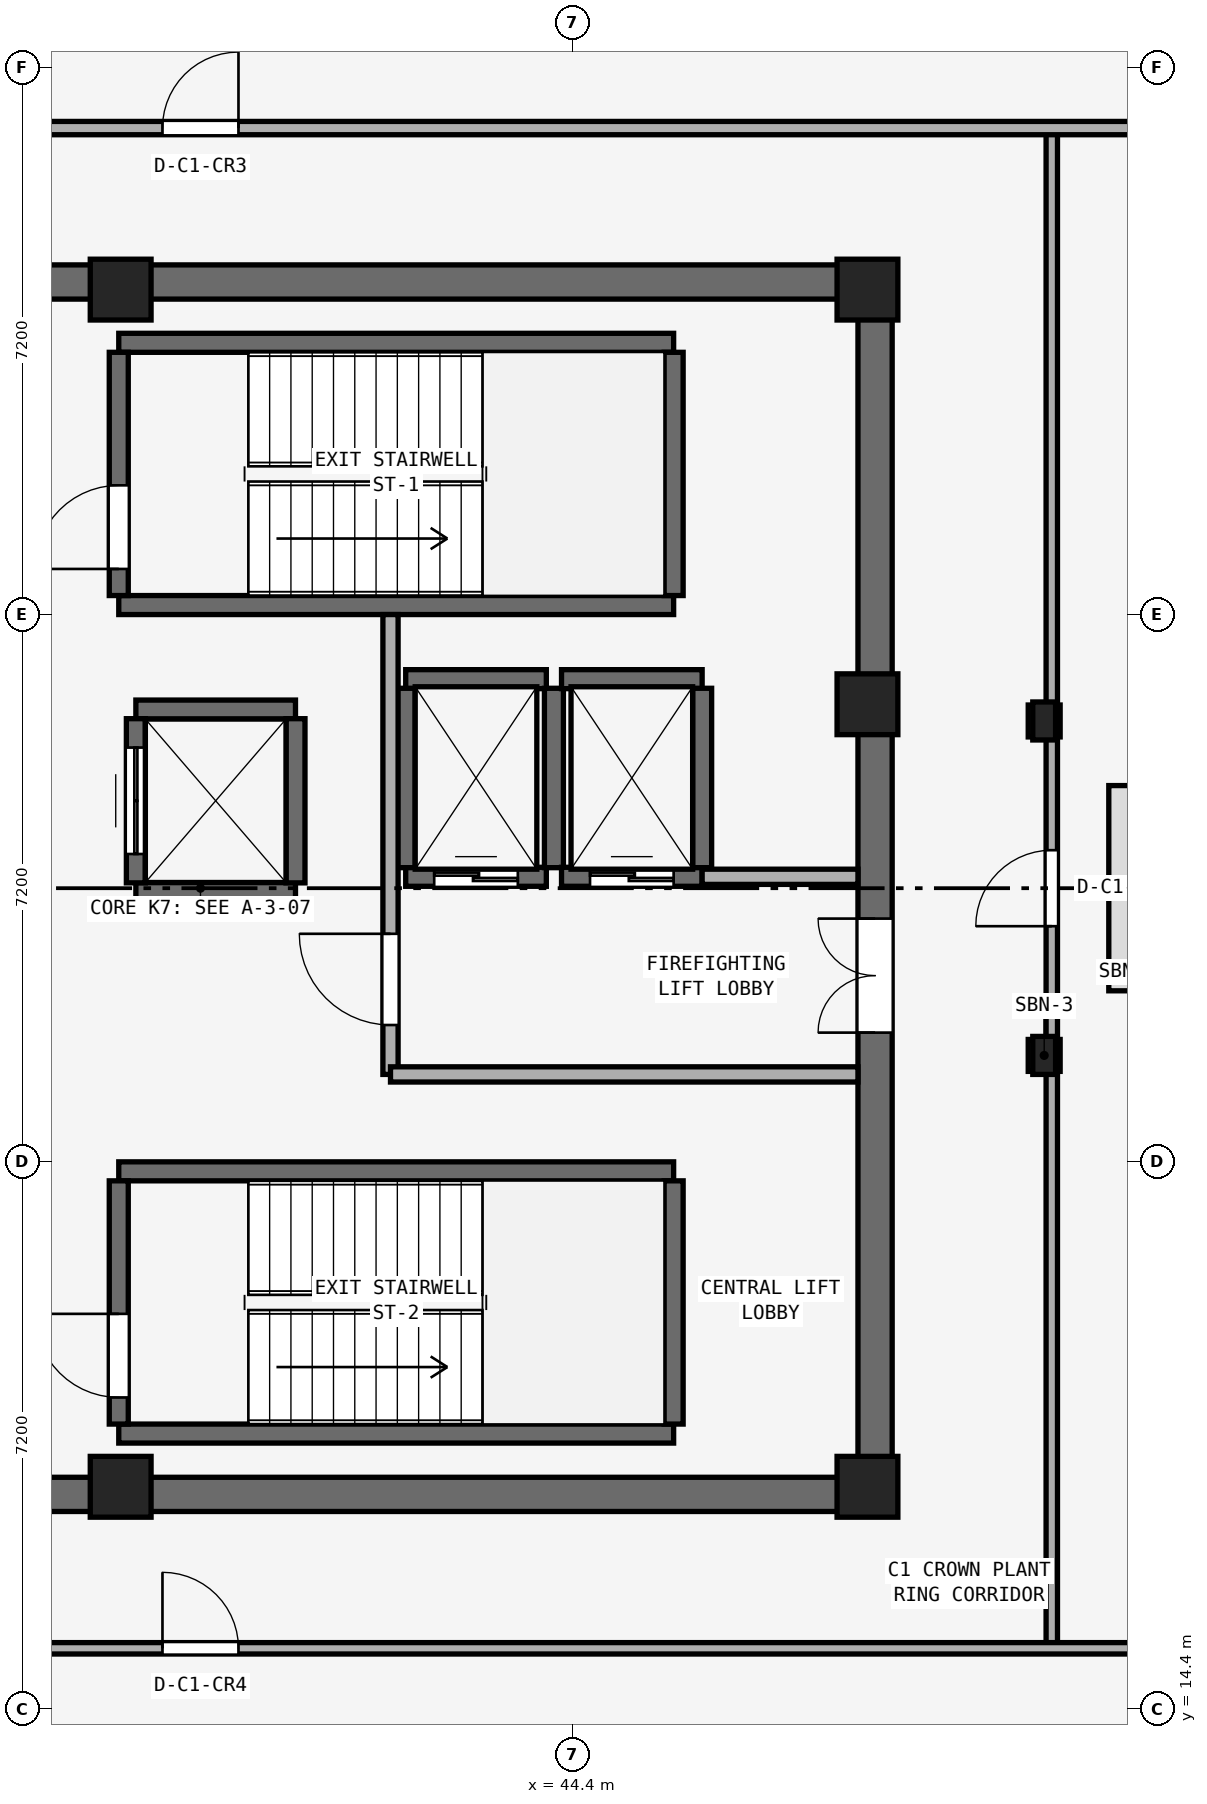
"""IFC4 building model, lengths in metres.
Left out: names, types, materials, properties, quantities, classifications, styles, units other than length and angle.
Written with IfcOpenShell. Run it as: python <this file> out.ifc"""

import sys

from ifc_helpers import new_model, si_unit, direction, frame, frame_2d, origin, origin_2d, place, context, subcontext, project, spatial, rectangle, i_section, extrude, element, fill, save


model = new_model("IFC4")
c1 = context("Model", 3, precision=1e-05, world=origin(), true_north=direction((0.0, 1.0)))
c2 = subcontext(c1, "Body", "Model", "MODEL_VIEW")
j1 = project(units=[si_unit("LENGTHUNIT", "METRE"), si_unit("PLANEANGLEUNIT", "RADIAN")], contexts=[c1])
p1 = place(None, origin())
s1 = spatial("IfcSite", under=j1, at=p1, CompositionType="ELEMENT")
p2 = place(p1, origin())
s2 = spatial("IfcBuilding", under=s1, at=p2, CompositionType="ELEMENT")
p3 = place(p2, frame((0.0, 0.0, 313.4)))
s3 = spatial("IfcBuildingStorey", under=s2, at=p3, CompositionType="ELEMENT", Elevation=313.4)
for number, where, z_axis, x_axis in (
    (1, (30.4, 17.225, 0.0), (0.0, 0.0, 1.0), (1.0, 0.0, 0.0)),
    (2, (30.4, 33.175, 0.0), (0.0, 0.0, 1.0), (1.0, 0.0, 0.0)),
):
    element("IfcWall", number, at=place(p3, frame(where, z_axis=z_axis, x_axis=x_axis)), inside=s3, PredefinedType="SHEAR", context=c2, shape_type="SweptSolid", body=[
        extrude(rectangle(XDim=18.2, YDim=0.45, at=frame_2d((9.1, 0.0))), origin(), (0.0, 0.0, 1.0), 3.72),
    ])
p4 = place(p3, frame((48.375, 17.45, 0.0), z_axis=(0.0, 0.0, 1.0), x_axis=(0.0, 1.0, 0.0)))
e3 = element("IfcWall", 3, at=p4, inside=s3, PredefinedType="SHEAR", context=c2, shape_type="SweptSolid", body=[
    extrude(rectangle(XDim=15.5, YDim=0.45, at=frame_2d((7.75, 0.0))), origin(), (0.0, 0.0, 1.0), 3.72),
])
p5 = place(p4, frame((5.85, 0.0, 0.0)))
e4 = element("IfcOpeningElement", 4, at=p5, cuts=e3, PredefinedType="OPENING", context=c2, shape_type="SweptSolid", body=[
    extrude(rectangle(XDim=1.5, YDim=2.15, at=frame_2d((0.75, 1.075))), frame((0.0, 0.235, 0.0), z_axis=(0.0, -1.0, 0.0), x_axis=(1.0, 0.0, 0.0)), (0.0, 0.0, 1.0), 0.47),
])
for number, where, z_axis, x_axis in (
    (5, (38.45, 17.325, 0.0), (0.0, 0.0, 1.0), (1.0, 0.0, 0.0)),
    (6, (48.275, 17.325, 0.0), (0.0, 0.0, 1.0), (1.0, 0.0, 0.0)),
    (7, (48.275, 27.62, 0.0), (0.0, 0.0, 1.0), (1.0, 0.0, 0.0)),
    (8, (48.275, 33.075, 0.0), (0.0, 0.0, 1.0), (1.0, 0.0, 0.0)),
    (9, (38.45, 33.075, 0.0), (0.0, 0.0, 1.0), (1.0, 0.0, 0.0)),
):
    element("IfcColumn", number, at=place(p3, frame(where, z_axis=z_axis, x_axis=x_axis)), inside=s3, PredefinedType="PILASTER", context=c2, shape_type="SweptSolid", body=[
        extrude(rectangle(XDim=0.8, YDim=0.8, at=origin_2d()), origin(), (0.0, 0.0, 1.0), 4.0),
    ])
for number, where, z_axis, x_axis in (
    (10, (50.6, 23.0, -0.28), (0.0, 0.0, 1.0), (1.0, 0.0, 0.0)),
    (11, (50.6, 27.4, -0.28), (0.0, 0.0, 1.0), (1.0, 0.0, 0.0)),
):
    element("IfcColumn", number, at=place(p3, frame(where, z_axis=z_axis, x_axis=x_axis)), inside=s3, PredefinedType="COLUMN", context=c2, shape_type="SweptSolid", body=[
        extrude(i_section(OverallWidth=0.3, OverallDepth=0.5, WebThickness=0.014, FlangeThickness=0.028, at=origin_2d()), origin(), (0.0, 0.0, 1.0), 4.28),
    ])
for number, where, z_axis, x_axis in (
    (12, (38.425, 28.925, 0.0), (0.0, 0.0, 1.0), (1.0, 0.0, 0.0)),
    (13, (38.425, 32.375, 0.0), (0.0, 0.0, 1.0), (1.0, 0.0, 0.0)),
):
    element("IfcWall", number, at=place(p3, frame(where, z_axis=z_axis, x_axis=x_axis)), inside=s3, PredefinedType="SHEAR", context=c2, shape_type="SweptSolid", body=[
        extrude(rectangle(XDim=7.3, YDim=0.25, at=frame_2d((3.65, 0.0))), origin(), (0.0, 0.0, 1.0), 3.72),
    ])
p6 = place(p3, frame((38.425, 29.05, 0.0), z_axis=(0.0, 0.0, 1.0), x_axis=(0.0, 1.0, 0.0)))
e14 = element("IfcWall", 14, at=p6, inside=s3, PredefinedType="SHEAR", context=c2, shape_type="SweptSolid", body=[
    extrude(rectangle(XDim=3.2, YDim=0.25, at=frame_2d((1.6, 0.0))), origin(), (0.0, 0.0, 1.0), 3.72),
])
p7 = place(p6, frame((0.35, 0.0, 0.0)))
e15 = element("IfcOpeningElement", 15, at=p7, cuts=e14, PredefinedType="OPENING", context=c2, shape_type="SweptSolid", body=[
    extrude(rectangle(XDim=1.1, YDim=2.15, at=frame_2d((0.55, 1.075))), frame((0.0, 0.135, 0.0), z_axis=(0.0, -1.0, 0.0), x_axis=(1.0, 0.0, 0.0)), (0.0, 0.0, 1.0), 0.27),
])
p8 = place(p3, frame((45.725, 29.05, 0.0), z_axis=(0.0, 0.0, 1.0), x_axis=(0.0, 1.0, 0.0)))
e16 = element("IfcWall", 16, at=p8, inside=s3, PredefinedType="SHEAR", context=c2, shape_type="SweptSolid", body=[
    extrude(rectangle(XDim=3.2, YDim=0.25, at=frame_2d((1.6, 0.0))), origin(), (0.0, 0.0, 1.0), 3.72),
])
for number, where, z_axis, x_axis in (
    (17, (38.425, 18.025, 0.0), (0.0, 0.0, 1.0), (1.0, 0.0, 0.0)),
    (18, (38.425, 21.475, 0.0), (0.0, 0.0, 1.0), (1.0, 0.0, 0.0)),
):
    element("IfcWall", number, at=place(p3, frame(where, z_axis=z_axis, x_axis=x_axis)), inside=s3, PredefinedType="SHEAR", context=c2, shape_type="SweptSolid", body=[
        extrude(rectangle(XDim=7.3, YDim=0.25, at=frame_2d((3.65, 0.0))), origin(), (0.0, 0.0, 1.0), 3.72),
    ])
p9 = place(p3, frame((38.425, 18.15, 0.0), z_axis=(0.0, 0.0, 1.0), x_axis=(0.0, 1.0, 0.0)))
e19 = element("IfcWall", 19, at=p9, inside=s3, PredefinedType="SHEAR", context=c2, shape_type="SweptSolid", body=[
    extrude(rectangle(XDim=3.2, YDim=0.25, at=frame_2d((1.6, 0.0))), origin(), (0.0, 0.0, 1.0), 3.72),
])
p10 = place(p9, frame((0.35, 0.0, 0.0)))
e20 = element("IfcOpeningElement", 20, at=p10, cuts=e19, PredefinedType="OPENING", context=c2, shape_type="SweptSolid", body=[
    extrude(rectangle(XDim=1.1, YDim=2.15, at=frame_2d((0.55, 1.075))), frame((0.0, 0.135, 0.0), z_axis=(0.0, -1.0, 0.0), x_axis=(1.0, 0.0, 0.0)), (0.0, 0.0, 1.0), 0.27),
])
p11 = place(p3, frame((45.725, 18.15, 0.0), z_axis=(0.0, 0.0, 1.0), x_axis=(0.0, 1.0, 0.0)))
e21 = element("IfcWall", 21, at=p11, inside=s3, PredefinedType="SHEAR", context=c2, shape_type="SweptSolid", body=[
    extrude(rectangle(XDim=3.2, YDim=0.25, at=frame_2d((1.6, 0.0))), origin(), (0.0, 0.0, 1.0), 3.72),
])
p12 = place(p3, frame((42.2, 25.35, 0.0), z_axis=(0.0, 0.0, 1.0), x_axis=(1.0, 0.0, 0.0)))
e22 = element("IfcWall", 22, at=p12, inside=s3, PredefinedType="SHEAR", context=c2, shape_type="SweptSolid", body=[
    extrude(rectangle(XDim=1.85, YDim=0.25, at=frame_2d((0.925, 0.0))), origin(), (0.0, 0.0, 1.0), 3.72),
])
p13 = place(p12, frame((0.375, 0.0, 0.0)))
e23 = element("IfcOpeningElement", 23, at=p13, cuts=e22, PredefinedType="OPENING", context=c2, shape_type="SweptSolid", body=[
    extrude(rectangle(XDim=1.1, YDim=2.15, at=frame_2d((0.55, 1.075))), frame((0.0, 0.135, 0.0), z_axis=(0.0, -1.0, 0.0), x_axis=(1.0, 0.0, 0.0)), (0.0, 0.0, 1.0), 0.27),
])
p14 = place(p3, frame((42.2, 27.95, 0.0), z_axis=(0.0, 0.0, 1.0), x_axis=(1.0, 0.0, 0.0)))
e24 = element("IfcWall", 24, at=p14, inside=s3, PredefinedType="SHEAR", context=c2, shape_type="SweptSolid", body=[
    extrude(rectangle(XDim=1.85, YDim=0.25, at=frame_2d((0.925, 0.0))), origin(), (0.0, 0.0, 1.0), 3.72),
])
for number, where, z_axis, x_axis in (
    (25, (42.2, 25.47, 0.0), (0.0, 0.0, 1.0), (0.0, 1.0, 0.0)),
    (26, (44.15, 25.47, 0.0), (0.0, 0.0, 1.0), (0.0, 1.0, 0.0)),
):
    element("IfcWall", number, at=place(p3, frame(where, z_axis=z_axis, x_axis=x_axis)), inside=s3, PredefinedType="SHEAR", context=c2, shape_type="SweptSolid", body=[
        extrude(rectangle(XDim=2.36, YDim=0.25, at=frame_2d((1.18, 0.0))), origin(), (0.0, 0.0, 1.0), 3.72),
    ])
p15 = place(p3, frame((44.25, 25.35, 0.0), z_axis=(0.0, 0.0, 1.0), x_axis=(1.0, 0.0, 0.0)))
e27 = element("IfcWall", 27, at=p15, inside=s3, PredefinedType="SHEAR", context=c2, shape_type="SweptSolid", body=[
    extrude(rectangle(XDim=1.85, YDim=0.25, at=frame_2d((0.925, 0.0))), origin(), (0.0, 0.0, 1.0), 3.72),
])
p16 = place(p15, frame((0.375, 0.0, 0.0)))
e28 = element("IfcOpeningElement", 28, at=p16, cuts=e27, PredefinedType="OPENING", context=c2, shape_type="SweptSolid", body=[
    extrude(rectangle(XDim=1.1, YDim=2.15, at=frame_2d((0.55, 1.075))), frame((0.0, 0.135, 0.0), z_axis=(0.0, -1.0, 0.0), x_axis=(1.0, 0.0, 0.0)), (0.0, 0.0, 1.0), 0.27),
])
p17 = place(p3, frame((44.25, 27.95, 0.0), z_axis=(0.0, 0.0, 1.0), x_axis=(1.0, 0.0, 0.0)))
e29 = element("IfcWall", 29, at=p17, inside=s3, PredefinedType="SHEAR", context=c2, shape_type="SweptSolid", body=[
    extrude(rectangle(XDim=1.85, YDim=0.25, at=frame_2d((0.925, 0.0))), origin(), (0.0, 0.0, 1.0), 3.72),
])
p18 = place(p3, frame((46.1, 25.47, 0.0), z_axis=(0.0, 0.0, 1.0), x_axis=(0.0, 1.0, 0.0)))
e30 = element("IfcWall", 30, at=p18, inside=s3, PredefinedType="SHEAR", context=c2, shape_type="SweptSolid", body=[
    extrude(rectangle(XDim=2.36, YDim=0.25, at=frame_2d((1.18, 0.0))), origin(), (0.0, 0.0, 1.0), 3.72),
])
for number, where, z_axis, x_axis in (
    (31, (38.65, 25.15, 0.0), (0.0, 0.0, 1.0), (1.0, 0.0, 0.0)),
    (32, (38.65, 27.55, 0.0), (0.0, 0.0, 1.0), (1.0, 0.0, 0.0)),
):
    element("IfcWall", number, at=place(p3, frame(where, z_axis=z_axis, x_axis=x_axis)), inside=s3, PredefinedType="SHEAR", context=c2, shape_type="SweptSolid", body=[
        extrude(rectangle(XDim=2.1, YDim=0.25, at=frame_2d((1.05, 0.0))), origin(), (0.0, 0.0, 1.0), 3.72),
    ])
p19 = place(p3, frame((38.65, 25.27, 0.0), z_axis=(0.0, 0.0, 1.0), x_axis=(0.0, 1.0, 0.0)))
e33 = element("IfcWall", 33, at=p19, inside=s3, PredefinedType="SHEAR", context=c2, shape_type="SweptSolid", body=[
    extrude(rectangle(XDim=2.16, YDim=0.25, at=frame_2d((1.08, 0.0))), origin(), (0.0, 0.0, 1.0), 3.72),
])
p20 = place(p19, frame((0.38, 0.0, 0.0)))
e34 = element("IfcOpeningElement", 34, at=p20, cuts=e33, PredefinedType="OPENING", context=c2, shape_type="SweptSolid", body=[
    extrude(rectangle(XDim=1.4, YDim=2.2, at=frame_2d((0.7, 1.1))), frame((0.0, 0.135, 0.0), z_axis=(0.0, -1.0, 0.0), x_axis=(1.0, 0.0, 0.0)), (0.0, 0.0, 1.0), 0.27),
])
p21 = place(p3, frame((40.75, 25.27, 0.0), z_axis=(0.0, 0.0, 1.0), x_axis=(0.0, 1.0, 0.0)))
e35 = element("IfcWall", 35, at=p21, inside=s3, PredefinedType="SHEAR", context=c2, shape_type="SweptSolid", body=[
    extrude(rectangle(XDim=2.16, YDim=0.25, at=frame_2d((1.08, 0.0))), origin(), (0.0, 0.0, 1.0), 3.72),
])
p22 = place(p3, frame((42.0, 22.75, 0.0), z_axis=(0.0, 0.0, 1.0), x_axis=(0.0, 1.0, 0.0)))
e36 = element("IfcWall", 36, at=p22, inside=s3, PredefinedType="SOLIDWALL", context=c2, shape_type="SweptSolid", body=[
    extrude(rectangle(XDim=6.05, YDim=0.2, at=frame_2d((3.025, 0.0))), origin(), (0.0, 0.0, 1.0), 3.72),
])
p23 = place(p22, frame((0.65, 0.0, 0.0)))
e37 = element("IfcOpeningElement", 37, at=p23, cuts=e36, PredefinedType="OPENING", context=c2, shape_type="SweptSolid", body=[
    extrude(rectangle(XDim=1.2, YDim=2.15, at=frame_2d((0.6, 1.075))), frame((0.0, 0.11, 0.0), z_axis=(0.0, -1.0, 0.0), x_axis=(1.0, 0.0, 0.0)), (0.0, 0.0, 1.0), 0.22),
])
p24 = place(p3, frame((42.0, 22.75, 0.0), z_axis=(0.0, 0.0, 1.0), x_axis=(1.0, 0.0, 0.0)))
e38 = element("IfcWall", 38, at=p24, inside=s3, PredefinedType="SOLIDWALL", context=c2, shape_type="SweptSolid", body=[
    extrude(rectangle(XDim=6.15, YDim=0.2, at=frame_2d((3.075, 0.0))), origin(), (0.0, 0.0, 1.0), 3.72),
])
p25 = place(p3, frame((46.1, 25.35, 0.0), z_axis=(0.0, 0.0, 1.0), x_axis=(1.0, 0.0, 0.0)))
e39 = element("IfcWall", 39, at=p25, inside=s3, PredefinedType="SOLIDWALL", context=c2, shape_type="SweptSolid", body=[
    extrude(rectangle(XDim=2.05, YDim=0.2, at=frame_2d((1.025, 0.0))), origin(), (0.0, 0.0, 1.0), 3.72),
])
p26 = place(p3, frame((50.7, 15.2, 0.0), z_axis=(0.0, 0.0, 1.0), x_axis=(0.0, 1.0, 0.0)))
e40 = element("IfcWall", 40, at=p26, inside=s3, PredefinedType="PARTITIONING", context=c2, shape_type="SweptSolid", body=[
    extrude(rectangle(XDim=20.0, YDim=0.15, at=frame_2d((10.0, 0.0))), origin(), (0.0, 0.0, 1.0), 3.72),
])
p27 = place(p26, frame((9.5, 0.0, 0.0)))
e41 = element("IfcOpeningElement", 41, at=p27, cuts=e40, PredefinedType="OPENING", context=c2, shape_type="SweptSolid", body=[
    extrude(rectangle(XDim=1.0, YDim=2.12, at=frame_2d((0.5, 1.06))), frame((0.0, 0.085, 0.0), z_axis=(0.0, -1.0, 0.0), x_axis=(1.0, 0.0, 0.0)), (0.0, 0.0, 1.0), 0.17),
])
p28 = place(p3, frame((19.292, 15.2, 0.0), z_axis=(0.0, 0.0, 1.0), x_axis=(1.0, 0.0, 0.0)))
e42 = element("IfcWall", 42, at=p28, inside=s3, PredefinedType="PARTITIONING", context=c2, shape_type="SweptSolid", body=[
    extrude(rectangle(XDim=39.076, YDim=0.15, at=frame_2d((19.538, 0.0))), origin(), (0.0, 0.0, 1.0), 3.103),
])
p29 = place(p28, frame((19.708, 0.0, 0.0)))
e43 = element("IfcOpeningElement", 43, at=p29, cuts=e42, PredefinedType="OPENING", context=c2, shape_type="SweptSolid", body=[
    extrude(rectangle(XDim=1.0, YDim=2.12, at=frame_2d((0.5, 1.06))), frame((0.0, 0.085, 0.0), z_axis=(0.0, -1.0, 0.0), x_axis=(1.0, 0.0, 0.0)), (0.0, 0.0, 1.0), 0.17),
])
p30 = place(p3, frame((20.01, 35.2, 0.0), z_axis=(0.0, 0.0, 1.0), x_axis=(1.0, 0.0, 0.0)))
e44 = element("IfcWall", 44, at=p30, inside=s3, PredefinedType="PARTITIONING", context=c2, shape_type="SweptSolid", body=[
    extrude(rectangle(XDim=39.04, YDim=0.175, at=frame_2d((19.52, 0.0))), origin(), (0.0, 0.0, 1.0), 3.103),
])
p31 = place(p30, frame((18.99, 0.0, 0.0)))
e45 = element("IfcOpeningElement", 45, at=p31, cuts=e44, PredefinedType="OPENING", context=c2, shape_type="SweptSolid", body=[
    extrude(rectangle(XDim=1.0, YDim=2.12, at=frame_2d((0.5, 1.06))), frame((0.0, 0.097, 0.0), z_axis=(0.0, -1.0, 0.0), x_axis=(1.0, 0.0, 0.0)), (0.0, 0.0, 1.0), 0.195),
])
p32 = place(p3, frame((47.908, 6.388, 0.0), z_axis=(0.0, 0.0, 1.0), x_axis=(0.763574643448, 0.645719570621, 0.0)))
e46 = element("IfcWall", 46, at=p32, inside=s3, PredefinedType="STANDARD", context=c2, shape_type="SweptSolid", body=[
    extrude(rectangle(XDim=13.616, YDim=0.28, at=frame_2d((6.808, 0.0))), origin(), (0.0, 0.0, 1.0), 3.72),
])
p33 = place(p32, frame((1.803, 0.0, 0.9)))
e47 = element("IfcOpeningElement", 47, at=p33, cuts=e46, PredefinedType="OPENING", context=c2, shape_type="SweptSolid", body=[
    extrude(rectangle(XDim=1.6, YDim=1.45, at=frame_2d((0.8, 0.725))), frame((0.0, 0.15, 0.0), z_axis=(0.0, -1.0, 0.0), x_axis=(1.0, 0.0, 0.0)), (0.0, 0.0, 1.0), 0.3),
])
p34 = place(p32, frame((6.008, 0.0, 0.9)))
e48 = element("IfcOpeningElement", 48, at=p34, cuts=e46, PredefinedType="OPENING", context=c2, shape_type="SweptSolid", body=[
    extrude(rectangle(XDim=1.6, YDim=1.45, at=frame_2d((0.8, 0.725))), frame((0.0, 0.15, 0.0), z_axis=(0.0, -1.0, 0.0), x_axis=(1.0, 0.0, 0.0)), (0.0, 0.0, 1.0), 0.3),
])
p35 = place(p32, frame((10.213, 0.0, 0.9)))
e49 = element("IfcOpeningElement", 49, at=p35, cuts=e46, PredefinedType="OPENING", context=c2, shape_type="SweptSolid", body=[
    extrude(rectangle(XDim=1.6, YDim=1.45, at=frame_2d((0.8, 0.725))), frame((0.0, 0.15, 0.0), z_axis=(0.0, -1.0, 0.0), x_axis=(1.0, 0.0, 0.0)), (0.0, 0.0, 1.0), 0.3),
])
p36 = place(p7, origin())
e50 = element("IfcDoor", 50, at=p36, inside=s3, OperationType="SINGLE_SWING_LEFT", PredefinedType="DOOR", context=c2, shape_type="SweptSolid", body=[
    extrude(rectangle(XDim=1.1, YDim=2.15, at=frame_2d((0.55, 1.075))), frame((0.0, 0.025, 0.0), z_axis=(0.0, -1.0, 0.0), x_axis=(1.0, 0.0, 0.0)), (0.0, 0.0, 1.0), 0.05),
])
fill(e15, e50)
p37 = place(p10, origin())
e51 = element("IfcDoor", 51, at=p37, inside=s3, OperationType="SINGLE_SWING_RIGHT", PredefinedType="DOOR", context=c2, shape_type="SweptSolid", body=[
    extrude(rectangle(XDim=1.1, YDim=2.15, at=frame_2d((0.55, 1.075))), frame((0.0, 0.025, 0.0), z_axis=(0.0, -1.0, 0.0), x_axis=(1.0, 0.0, 0.0)), (0.0, 0.0, 1.0), 0.05),
])
fill(e20, e51)
p38 = place(p13, origin())
e52 = element("IfcDoor", 52, at=p38, inside=s3, OperationType="DOUBLE_DOOR_SLIDING", PredefinedType="DOOR", context=c2, shape_type="SweptSolid", body=[
    extrude(rectangle(XDim=1.1, YDim=2.15, at=frame_2d((0.55, 1.075))), frame((0.0, 0.025, 0.0), z_axis=(0.0, -1.0, 0.0), x_axis=(1.0, 0.0, 0.0)), (0.0, 0.0, 1.0), 0.05),
])
fill(e23, e52)
p39 = place(p16, origin())
e53 = element("IfcDoor", 53, at=p39, inside=s3, OperationType="DOUBLE_DOOR_SLIDING", PredefinedType="DOOR", context=c2, shape_type="SweptSolid", body=[
    extrude(rectangle(XDim=1.1, YDim=2.15, at=frame_2d((0.55, 1.075))), frame((0.0, 0.025, 0.0), z_axis=(0.0, -1.0, 0.0), x_axis=(1.0, 0.0, 0.0)), (0.0, 0.0, 1.0), 0.05),
])
fill(e28, e53)
p40 = place(p20, origin())
e54 = element("IfcDoor", 54, at=p40, inside=s3, OperationType="DOUBLE_DOOR_SLIDING", PredefinedType="DOOR", context=c2, shape_type="SweptSolid", body=[
    extrude(rectangle(XDim=1.4, YDim=2.2, at=frame_2d((0.7, 1.1))), frame((0.0, 0.025, 0.0), z_axis=(0.0, -1.0, 0.0), x_axis=(1.0, 0.0, 0.0)), (0.0, 0.0, 1.0), 0.05),
])
fill(e34, e54)
p41 = place(p23, origin())
e55 = element("IfcDoor", 55, at=p41, inside=s3, OperationType="SINGLE_SWING_RIGHT", PredefinedType="DOOR", context=c2, shape_type="SweptSolid", body=[
    extrude(rectangle(XDim=1.2, YDim=2.15, at=frame_2d((0.6, 1.075))), frame((0.0, 0.025, 0.0), z_axis=(0.0, -1.0, 0.0), x_axis=(1.0, 0.0, 0.0)), (0.0, 0.0, 1.0), 0.05),
])
fill(e37, e55)
p42 = place(p5, origin())
e56 = element("IfcDoor", 56, at=p42, inside=s3, OperationType="DOUBLE_DOOR_SINGLE_SWING", PredefinedType="DOOR", context=c2, shape_type="SweptSolid", body=[
    extrude(rectangle(XDim=1.5, YDim=2.15, at=frame_2d((0.75, 1.075))), frame((0.0, 0.025, 0.0), z_axis=(0.0, -1.0, 0.0), x_axis=(1.0, 0.0, 0.0)), (0.0, 0.0, 1.0), 0.05),
])
fill(e4, e56)
p43 = place(p27, origin())
e57 = element("IfcDoor", 57, at=p43, inside=s3, OperationType="SINGLE_SWING_LEFT", PredefinedType="DOOR", context=c2, shape_type="SweptSolid", body=[
    extrude(rectangle(XDim=1.0, YDim=2.12, at=frame_2d((0.5, 1.06))), frame((0.0, 0.025, 0.0), z_axis=(0.0, -1.0, 0.0), x_axis=(1.0, 0.0, 0.0)), (0.0, 0.0, 1.0), 0.05),
])
fill(e41, e57)
p44 = place(p31, origin())
e58 = element("IfcDoor", 58, at=p44, inside=s3, OperationType="SINGLE_SWING_RIGHT", PredefinedType="DOOR", context=c2, shape_type="SweptSolid", body=[
    extrude(rectangle(XDim=1.0, YDim=2.12, at=frame_2d((0.5, 1.06))), frame((0.0, 0.025, 0.0), z_axis=(0.0, -1.0, 0.0), x_axis=(1.0, 0.0, 0.0)), (0.0, 0.0, 1.0), 0.05),
])
fill(e45, e58)
p45 = place(p29, origin())
e59 = element("IfcDoor", 59, at=p45, inside=s3, OperationType="SINGLE_SWING_LEFT", PredefinedType="DOOR", context=c2, shape_type="SweptSolid", body=[
    extrude(rectangle(XDim=1.0, YDim=2.12, at=frame_2d((0.5, 1.06))), frame((0.0, 0.025, 0.0), z_axis=(0.0, -1.0, 0.0), x_axis=(1.0, 0.0, 0.0)), (0.0, 0.0, 1.0), 0.05),
])
fill(e43, e59)
save(model, sys.argv[1])
